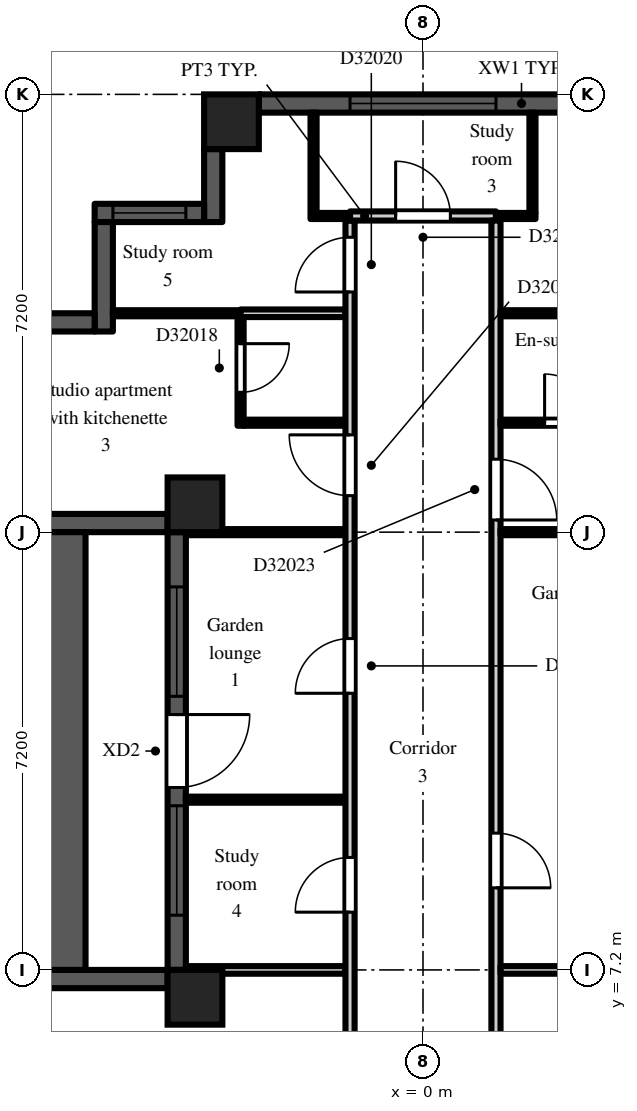
"""IFC4 building model, lengths in metres.
Left out: names, types, materials, properties, quantities, classifications, styles, units other than length and angle.
Written with IfcOpenShell. Run it as: python <this file> out.ifc"""

import sys

from ifc_helpers import new_model, si_unit, direction, frame, frame_2d, origin, origin_2d, place, context, subcontext, project, spatial, rectangle, extrude, element, fill, save


model = new_model("IFC4")
c1 = context("Model", 3, precision=1e-05, world=origin(), true_north=direction((0.0, 1.0)))
c2 = subcontext(c1, "Body", "Model", "MODEL_VIEW")
j1 = project(units=[si_unit("LENGTHUNIT", "METRE"), si_unit("PLANEANGLEUNIT", "RADIAN")], contexts=[c1])
p1 = place(None, origin())
s1 = spatial("IfcSite", under=j1, at=p1, CompositionType="ELEMENT")
p2 = place(p1, origin())
s2 = spatial("IfcBuilding", under=s1, at=p2, CompositionType="ELEMENT")
p3 = place(p2, frame((0.0, 0.0, 225.9)))
s3 = spatial("IfcBuildingStorey", under=s2, at=p3, CompositionType="ELEMENT", Elevation=225.9)
for number, where, z_axis, x_axis in (
    (1, (-3.75, 6.75, 0.0), (0.0, 0.0, 1.0), (1.0, 0.0, 0.0)),
    (2, (-3.75, 14.85, 0.0), (0.0, 0.0, 1.0), (1.0, 0.0, 0.0)),
    (3, (-3.15, 21.15, 0.0), (0.0, 0.0, 1.0), (1.0, 0.0, 0.0)),
):
    element("IfcColumn", number, at=place(p3, frame(where, z_axis=z_axis, x_axis=x_axis)), inside=s3, PredefinedType="COLUMN", context=c2, shape_type="SweptSolid", body=[
        extrude(rectangle(XDim=0.9, YDim=0.9, at=origin_2d()), origin(), (0.0, 0.0, 1.0), 3.0),
    ])
p4 = place(p3, frame((2.7, 21.45, 0.0), z_axis=(0.0, 0.0, 1.0), x_axis=(-1.0, 0.0, 0.0)))
e4 = element("IfcWall", 4, at=p4, inside=s3, PredefinedType="SOLIDWALL", context=c2, shape_type="SweptSolid", body=[
    extrude(rectangle(XDim=5.4, YDim=0.3, at=frame_2d((2.7, 0.0))), origin(), (0.0, 0.0, 1.0), 2.3),
])
p5 = place(p4, frame((1.5, 0.0, 0.2)))
e5 = element("IfcOpeningElement", 5, at=p5, cuts=e4, PredefinedType="OPENING", context=c2, shape_type="SweptSolid", body=[
    extrude(rectangle(XDim=2.4, YDim=1.85, at=frame_2d((1.2, 0.925))), frame((0.0, 0.16, 0.0), z_axis=(0.0, -1.0, 0.0), x_axis=(1.0, 0.0, 0.0)), (0.0, 0.0, 1.0), 0.32),
])
p6 = place(p3, frame((-3.45, 20.7, 0.0), z_axis=(0.0, 0.0, 1.0), x_axis=(0.0, -1.0, 0.0)))
e6 = element("IfcWall", 6, at=p6, inside=s3, PredefinedType="SOLIDWALL", context=c2, shape_type="SweptSolid", body=[
    extrude(rectangle(XDim=1.2, YDim=0.3, at=frame_2d((0.6, 0.0))), origin(), (0.0, 0.0, 1.0), 2.6),
])
p7 = place(p3, frame((-3.6, 19.65, 0.0), z_axis=(0.0, 0.0, 1.0), x_axis=(-1.0, 0.0, 0.0)))
e7 = element("IfcWall", 7, at=p7, inside=s3, PredefinedType="SOLIDWALL", context=c2, shape_type="SweptSolid", body=[
    extrude(rectangle(XDim=1.8, YDim=0.3, at=frame_2d((0.9, 0.0))), origin(), (0.0, 0.0, 1.0), 2.6),
])
p8 = place(p7, frame((0.3, 0.0, 0.2)))
e8 = element("IfcOpeningElement", 8, at=p8, cuts=e7, PredefinedType="OPENING", context=c2, shape_type="SweptSolid", body=[
    extrude(rectangle(XDim=1.2, YDim=1.85, at=frame_2d((0.6, 0.925))), frame((0.0, 0.16, 0.0), z_axis=(0.0, -1.0, 0.0), x_axis=(1.0, 0.0, 0.0)), (0.0, 0.0, 1.0), 0.32),
])
p9 = place(p3, frame((-5.25, 19.5, 0.0), z_axis=(0.0, 0.0, 1.0), x_axis=(0.0, -1.0, 0.0)))
e9 = element("IfcWall", 9, at=p9, inside=s3, PredefinedType="SOLIDWALL", context=c2, shape_type="SweptSolid", body=[
    extrude(rectangle(XDim=1.8, YDim=0.3, at=frame_2d((0.9, 0.0))), origin(), (0.0, 0.0, 1.0), 2.6),
])
p10 = place(p3, frame((-5.4, 17.85, 0.0), z_axis=(0.0, 0.0, 1.0), x_axis=(-1.0, 0.0, 0.0)))
e10 = element("IfcWall", 10, at=p10, inside=s3, PredefinedType="SOLIDWALL", context=c2, shape_type="SweptSolid", body=[
    extrude(rectangle(XDim=0.9, YDim=0.3, at=frame_2d((0.45, 0.0))), origin(), (0.0, 0.0, 1.0), 2.6),
])
p11 = place(p3, frame((-6.3, 14.55, 0.0), z_axis=(0.0, 0.0, 1.0), x_axis=(1.0, 0.0, 0.0)))
e11 = element("IfcWall", 11, at=p11, inside=s3, PredefinedType="SOLIDWALL", context=c2, shape_type="SweptSolid", body=[
    extrude(rectangle(XDim=2.1, YDim=0.3, at=frame_2d((1.05, 0.0))), origin(), (0.0, 0.0, 1.0), 2.3),
])
p12 = place(p3, frame((-4.05, 14.4, 0.0), z_axis=(0.0, 0.0, 1.0), x_axis=(0.0, -1.0, 0.0)))
e12 = element("IfcWall", 12, at=p12, inside=s3, PredefinedType="SOLIDWALL", context=c2, shape_type="SweptSolid", body=[
    extrude(rectangle(XDim=7.2, YDim=0.3, at=frame_2d((3.6, 0.0))), origin(), (0.0, 0.0, 1.0), 2.3),
])
p13 = place(p12, frame((3.0, 0.0, 0.0)))
e13 = element("IfcOpeningElement", 13, at=p13, cuts=e12, PredefinedType="OPENING", context=c2, shape_type="SweptSolid", body=[
    extrude(rectangle(XDim=1.2, YDim=2.05, at=frame_2d((0.6, 1.025))), frame((0.0, 0.16, 0.0), z_axis=(0.0, -1.0, 0.0), x_axis=(1.0, 0.0, 0.0)), (0.0, 0.0, 1.0), 0.32),
])
p14 = place(p12, frame((0.9, 0.0, 0.2)))
e14 = element("IfcOpeningElement", 14, at=p14, cuts=e12, PredefinedType="OPENING", context=c2, shape_type="SweptSolid", body=[
    extrude(rectangle(XDim=1.8, YDim=1.85, at=frame_2d((0.9, 0.925))), frame((0.0, 0.16, 0.0), z_axis=(0.0, -1.0, 0.0), x_axis=(1.0, 0.0, 0.0)), (0.0, 0.0, 1.0), 0.32),
])
p15 = place(p12, frame((4.5, 0.0, 0.2)))
e15 = element("IfcOpeningElement", 15, at=p15, cuts=e12, PredefinedType="OPENING", context=c2, shape_type="SweptSolid", body=[
    extrude(rectangle(XDim=1.8, YDim=1.85, at=frame_2d((0.9, 0.925))), frame((0.0, 0.16, 0.0), z_axis=(0.0, -1.0, 0.0), x_axis=(1.0, 0.0, 0.0)), (0.0, 0.0, 1.0), 0.32),
])
p16 = place(p3, frame((-4.2, 7.05, 0.0), z_axis=(0.0, 0.0, 1.0), x_axis=(-1.0, 0.0, 0.0)))
e16 = element("IfcWall", 16, at=p16, inside=s3, PredefinedType="SOLIDWALL", context=c2, shape_type="SweptSolid", body=[
    extrude(rectangle(XDim=3.0, YDim=0.3, at=frame_2d((1.5, 0.0))), origin(), (0.0, 0.0, 1.0), 2.3),
])
p17 = place(p3, frame((-6.0, 7.2, 0.0), z_axis=(0.0, 0.0, 1.0), x_axis=(0.0, 1.0, 0.0)))
e17 = element("IfcWall", 17, at=p17, inside=s3, PredefinedType="PARAPET", context=c2, shape_type="SweptSolid", body=[
    extrude(rectangle(XDim=7.2, YDim=0.9, at=frame_2d((3.6, 0.0))), origin(), (0.0, 0.0, 1.0), 0.8),
])
p18 = place(p3, frame((-5.1, 18.0, 0.0), z_axis=(0.0, 0.0, 1.0), x_axis=(1.0, 0.0, 0.0)))
e18 = element("IfcWall", 18, at=p18, inside=s3, PredefinedType="PARTITIONING", context=c2, shape_type="SweptSolid", body=[
    extrude(rectangle(XDim=2.1, YDim=0.1, at=frame_2d((1.05, 0.0))), origin(), (0.0, 0.0, 1.0), 2.6),
])
p19 = place(p3, frame((-3.9, 7.2, 0.0), z_axis=(0.0, 0.0, 1.0), x_axis=(1.0, 0.0, 0.0)))
e19 = element("IfcWall", 19, at=p19, inside=s3, PredefinedType="PARTITIONING", context=c2, shape_type="SweptSolid", body=[
    extrude(rectangle(XDim=2.625, YDim=0.125, at=frame_2d((1.312, 0.0))), origin(), (0.0, 0.0, 1.0), 2.6),
])
for number, where, z_axis, x_axis in (
    (20, (-3.9, 10.0, 0.0), (0.0, 0.0, 1.0), (1.0, 0.0, 0.0)),
    (21, (-3.9, 14.4, 0.0), (0.0, 0.0, 1.0), (1.0, 0.0, 0.0)),
):
    element("IfcWall", number, at=place(p3, frame(where, z_axis=z_axis, x_axis=x_axis)), inside=s3, PredefinedType="PARTITIONING", context=c2, shape_type="SweptSolid", body=[
        extrude(rectangle(XDim=2.625, YDim=0.1, at=frame_2d((1.312, 0.0))), origin(), (0.0, 0.0, 1.0), 2.6),
    ])
p20 = place(p3, frame((-3.0, 16.15, 0.0), z_axis=(0.0, 0.0, 1.0), x_axis=(0.0, 1.0, 0.0)))
e22 = element("IfcWall", 22, at=p20, inside=s3, PredefinedType="PARTITIONING", context=c2, shape_type="SweptSolid", body=[
    extrude(rectangle(XDim=1.788, YDim=0.1, at=frame_2d((0.894, 0.0))), origin(), (0.0, 0.0, 1.0), 2.6),
])
p21 = place(p20, frame((0.55, 0.0, 0.0)))
e23 = element("IfcOpeningElement", 23, at=p21, cuts=e22, PredefinedType="OPENING", context=c2, shape_type="SweptSolid", body=[
    extrude(rectangle(XDim=0.8, YDim=2.1, at=frame_2d((0.4, 1.05))), frame((0.0, 0.06, 0.0), z_axis=(0.0, -1.0, 0.0), x_axis=(1.0, 0.0, 0.0)), (0.0, 0.0, 1.0), 0.12),
])
p22 = place(p3, frame((-2.95, 16.2, 0.0), z_axis=(0.0, 0.0, 1.0), x_axis=(1.0, 0.0, 0.0)))
e24 = element("IfcWall", 24, at=p22, inside=s3, PredefinedType="PARTITIONING", context=c2, shape_type="SweptSolid", body=[
    extrude(rectangle(XDim=1.675, YDim=0.1, at=frame_2d((0.837, 0.0))), origin(), (0.0, 0.0, 1.0), 2.6),
])
p23 = place(p3, frame((-3.0, 18.0, 0.0), z_axis=(0.0, 0.0, 1.0), x_axis=(1.0, 0.0, 0.0)))
e25 = element("IfcWall", 25, at=p23, inside=s3, PredefinedType="PARTITIONING", context=c2, shape_type="SweptSolid", body=[
    extrude(rectangle(XDim=1.725, YDim=0.125, at=frame_2d((0.863, 0.0))), origin(), (0.0, 0.0, 1.0), 2.6),
])
p24 = place(p3, frame((-1.8, 19.55, 0.0), z_axis=(0.0, 0.0, 1.0), x_axis=(0.0, 1.0, 0.0)))
e26 = element("IfcWall", 26, at=p24, inside=s3, PredefinedType="PARTITIONING", context=c2, shape_type="SweptSolid", body=[
    extrude(rectangle(XDim=1.75, YDim=0.1, at=frame_2d((0.875, 0.0))), origin(), (0.0, 0.0, 1.0), 2.6),
])
p25 = place(p3, frame((-1.75, 19.6, 0.0), z_axis=(0.0, 0.0, 1.0), x_axis=(1.0, 0.0, 0.0)))
e27 = element("IfcWall", 27, at=p25, inside=s3, PredefinedType="PARTITIONING", context=c2, shape_type="SweptSolid", body=[
    extrude(rectangle(XDim=0.55, YDim=0.1, at=frame_2d((0.275, 0.0))), origin(), (0.0, 0.0, 1.0), 2.6),
])
p26 = place(p3, frame((-1.2, 1.275, 0.0), z_axis=(0.0, 0.0, 1.0), x_axis=(0.0, 1.0, 0.0)))
e28 = element("IfcWall", 28, at=p26, inside=s3, PredefinedType="PARTITIONING", context=c2, shape_type="SweptSolid", body=[
    extrude(rectangle(XDim=18.25, YDim=0.15, at=frame_2d((9.125, 0.0))), origin(), (0.0, 0.0, 1.0), 2.6),
])
p27 = place(p26, frame((0.675, 0.0, 0.0)))
e29 = element("IfcOpeningElement", 29, at=p27, cuts=e28, PredefinedType="OPENING", context=c2, shape_type="SweptSolid", body=[
    extrude(rectangle(XDim=0.9, YDim=2.1, at=frame_2d((0.45, 1.05))), frame((0.0, 0.085, 0.0), z_axis=(0.0, -1.0, 0.0), x_axis=(1.0, 0.0, 0.0)), (0.0, 0.0, 1.0), 0.17),
])
p28 = place(p26, frame((3.675, 0.0, 0.0)))
e30 = element("IfcOpeningElement", 30, at=p28, cuts=e28, PredefinedType="OPENING", context=c2, shape_type="SweptSolid", body=[
    extrude(rectangle(XDim=0.9, YDim=2.1, at=frame_2d((0.45, 1.05))), frame((0.0, 0.085, 0.0), z_axis=(0.0, -1.0, 0.0), x_axis=(1.0, 0.0, 0.0)), (0.0, 0.0, 1.0), 0.17),
])
p29 = place(p26, frame((6.875, 0.0, 0.0)))
e31 = element("IfcOpeningElement", 31, at=p29, cuts=e28, PredefinedType="OPENING", context=c2, shape_type="SweptSolid", body=[
    extrude(rectangle(XDim=0.9, YDim=2.1, at=frame_2d((0.45, 1.05))), frame((0.0, 0.085, 0.0), z_axis=(0.0, -1.0, 0.0), x_axis=(1.0, 0.0, 0.0)), (0.0, 0.0, 1.0), 0.17),
])
p30 = place(p26, frame((10.475, 0.0, 0.0)))
e32 = element("IfcOpeningElement", 32, at=p30, cuts=e28, PredefinedType="OPENING", context=c2, shape_type="SweptSolid", body=[
    extrude(rectangle(XDim=0.9, YDim=2.1, at=frame_2d((0.45, 1.05))), frame((0.0, 0.085, 0.0), z_axis=(0.0, -1.0, 0.0), x_axis=(1.0, 0.0, 0.0)), (0.0, 0.0, 1.0), 0.17),
])
p31 = place(p26, frame((13.725, 0.0, 0.0)))
e33 = element("IfcOpeningElement", 33, at=p31, cuts=e28, PredefinedType="OPENING", context=c2, shape_type="SweptSolid", body=[
    extrude(rectangle(XDim=1.0, YDim=2.1, at=frame_2d((0.5, 1.05))), frame((0.0, 0.085, 0.0), z_axis=(0.0, -1.0, 0.0), x_axis=(1.0, 0.0, 0.0)), (0.0, 0.0, 1.0), 0.17),
])
p32 = place(p26, frame((17.075, 0.0, 0.0)))
e34 = element("IfcOpeningElement", 34, at=p32, cuts=e28, PredefinedType="OPENING", context=c2, shape_type="SweptSolid", body=[
    extrude(rectangle(XDim=0.9, YDim=2.1, at=frame_2d((0.45, 1.05))), frame((0.0, 0.085, 0.0), z_axis=(0.0, -1.0, 0.0), x_axis=(1.0, 0.0, 0.0)), (0.0, 0.0, 1.0), 0.17),
])
p33 = place(p3, frame((-1.2, 19.6, 0.0), z_axis=(0.0, 0.0, 1.0), x_axis=(1.0, 0.0, 0.0)))
e35 = element("IfcWall", 35, at=p33, inside=s3, PredefinedType="PARTITIONING", context=c2, shape_type="SweptSolid", body=[
    extrude(rectangle(XDim=2.4, YDim=0.15, at=frame_2d((1.2, 0.0))), origin(), (0.0, 0.0, 1.0), 2.6),
])
p34 = place(p33, frame((0.75, 0.0, 0.0)))
e36 = element("IfcOpeningElement", 36, at=p34, cuts=e35, PredefinedType="OPENING", context=c2, shape_type="SweptSolid", body=[
    extrude(rectangle(XDim=0.9, YDim=2.1, at=frame_2d((0.45, 1.05))), frame((0.0, 0.085, 0.0), z_axis=(0.0, -1.0, 0.0), x_axis=(1.0, 0.0, 0.0)), (0.0, 0.0, 1.0), 0.17),
])
p35 = place(p3, frame((1.2, 1.125, 0.0), z_axis=(0.0, 0.0, 1.0), x_axis=(0.0, 1.0, 0.0)))
e37 = element("IfcWall", 37, at=p35, inside=s3, PredefinedType="PARTITIONING", context=c2, shape_type="SweptSolid", body=[
    extrude(rectangle(XDim=18.4, YDim=0.15, at=frame_2d((9.2, 0.0))), origin(), (0.0, 0.0, 1.0), 2.6),
])
p36 = place(p35, frame((2.625, 0.0, 0.0)))
e38 = element("IfcOpeningElement", 38, at=p36, cuts=e37, PredefinedType="OPENING", context=c2, shape_type="SweptSolid", body=[
    extrude(rectangle(XDim=0.9, YDim=2.1, at=frame_2d((0.45, 1.05))), frame((0.0, 0.085, 0.0), z_axis=(0.0, -1.0, 0.0), x_axis=(1.0, 0.0, 0.0)), (0.0, 0.0, 1.0), 0.17),
])
p37 = place(p35, frame((7.425, 0.0, 0.0)))
e39 = element("IfcOpeningElement", 39, at=p37, cuts=e37, PredefinedType="OPENING", context=c2, shape_type="SweptSolid", body=[
    extrude(rectangle(XDim=0.9, YDim=2.1, at=frame_2d((0.45, 1.05))), frame((0.0, 0.085, 0.0), z_axis=(0.0, -1.0, 0.0), x_axis=(1.0, 0.0, 0.0)), (0.0, 0.0, 1.0), 0.17),
])
p38 = place(p35, frame((13.475, 0.0, 0.0)))
e40 = element("IfcOpeningElement", 40, at=p38, cuts=e37, PredefinedType="OPENING", context=c2, shape_type="SweptSolid", body=[
    extrude(rectangle(XDim=1.0, YDim=2.1, at=frame_2d((0.5, 1.05))), frame((0.0, 0.085, 0.0), z_axis=(0.0, -1.0, 0.0), x_axis=(1.0, 0.0, 0.0)), (0.0, 0.0, 1.0), 0.17),
])
p39 = place(p3, frame((1.275, 7.2, 0.0), z_axis=(0.0, 0.0, 1.0), x_axis=(1.0, 0.0, 0.0)))
e41 = element("IfcWall", 41, at=p39, inside=s3, PredefinedType="PARTITIONING", context=c2, shape_type="SweptSolid", body=[
    extrude(rectangle(XDim=2.625, YDim=0.125, at=frame_2d((1.312, 0.0))), origin(), (0.0, 0.0, 1.0), 2.6),
])
p40 = place(p3, frame((1.275, 14.4, 0.0), z_axis=(0.0, 0.0, 1.0), x_axis=(1.0, 0.0, 0.0)))
e42 = element("IfcWall", 42, at=p40, inside=s3, PredefinedType="PARTITIONING", context=c2, shape_type="SweptSolid", body=[
    extrude(rectangle(XDim=2.625, YDim=0.1, at=frame_2d((1.312, 0.0))), origin(), (0.0, 0.0, 1.0), 2.6),
])
p41 = place(p3, frame((1.275, 16.2, 0.0), z_axis=(0.0, 0.0, 1.0), x_axis=(1.0, 0.0, 0.0)))
e43 = element("IfcWall", 43, at=p41, inside=s3, PredefinedType="PARTITIONING", context=c2, shape_type="SweptSolid", body=[
    extrude(rectangle(XDim=2.375, YDim=0.1, at=frame_2d((1.188, 0.0))), origin(), (0.0, 0.0, 1.0), 2.6),
])
p42 = place(p41, frame((0.725, 0.0, 0.0)))
e44 = element("IfcOpeningElement", 44, at=p42, cuts=e43, PredefinedType="OPENING", context=c2, shape_type="SweptSolid", body=[
    extrude(rectangle(XDim=0.8, YDim=2.1, at=frame_2d((0.4, 1.05))), frame((0.0, 0.06, 0.0), z_axis=(0.0, -1.0, 0.0), x_axis=(1.0, 0.0, 0.0)), (0.0, 0.0, 1.0), 0.12),
])
p43 = place(p3, frame((1.275, 18.0, 0.0), z_axis=(0.0, 0.0, 1.0), x_axis=(1.0, 0.0, 0.0)))
e45 = element("IfcWall", 45, at=p43, inside=s3, PredefinedType="PARTITIONING", context=c2, shape_type="SweptSolid", body=[
    extrude(rectangle(XDim=2.375, YDim=0.1, at=frame_2d((1.188, 0.0))), origin(), (0.0, 0.0, 1.0), 2.6),
])
p44 = place(p3, frame((1.2, 19.6, 0.0), z_axis=(0.0, 0.0, 1.0), x_axis=(1.0, 0.0, 0.0)))
e46 = element("IfcWall", 46, at=p44, inside=s3, PredefinedType="PARTITIONING", context=c2, shape_type="SweptSolid", body=[
    extrude(rectangle(XDim=0.65, YDim=0.1, at=frame_2d((0.325, 0.0))), origin(), (0.0, 0.0, 1.0), 2.6),
])
p45 = place(p3, frame((1.8, 19.65, 0.0), z_axis=(0.0, 0.0, 1.0), x_axis=(0.0, 1.0, 0.0)))
e47 = element("IfcWall", 47, at=p45, inside=s3, PredefinedType="PARTITIONING", context=c2, shape_type="SweptSolid", body=[
    extrude(rectangle(XDim=1.65, YDim=0.1, at=frame_2d((0.825, 0.0))), origin(), (0.0, 0.0, 1.0), 2.6),
])
p46 = place(p5, origin())
e48 = element("IfcWindow", 48, at=p46, inside=s3, PartitioningType="SINGLE_PANEL", PredefinedType="WINDOW", context=c2, shape_type="SweptSolid", body=[
    extrude(rectangle(XDim=2.4, YDim=1.85, at=frame_2d((1.2, 0.925))), frame((0.0, 0.03, 0.0), z_axis=(0.0, -1.0, 0.0), x_axis=(1.0, 0.0, 0.0)), (0.0, 0.0, 1.0), 0.06),
])
fill(e5, e48)
p47 = place(p8, origin())
e49 = element("IfcWindow", 49, at=p47, inside=s3, PartitioningType="SINGLE_PANEL", PredefinedType="WINDOW", context=c2, shape_type="SweptSolid", body=[
    extrude(rectangle(XDim=1.2, YDim=1.85, at=frame_2d((0.6, 0.925))), frame((0.0, 0.03, 0.0), z_axis=(0.0, -1.0, 0.0), x_axis=(1.0, 0.0, 0.0)), (0.0, 0.0, 1.0), 0.06),
])
fill(e8, e49)
p48 = place(p13, origin())
e50 = element("IfcDoor", 50, at=p48, inside=s3, OperationType="SINGLE_SWING_LEFT", PredefinedType="DOOR", context=c2, shape_type="SweptSolid", body=[
    extrude(rectangle(XDim=1.2, YDim=2.05, at=frame_2d((0.6, 1.025))), frame((0.0, 0.025, 0.0), z_axis=(0.0, -1.0, 0.0), x_axis=(1.0, 0.0, 0.0)), (0.0, 0.0, 1.0), 0.05),
])
fill(e13, e50)
p49 = place(p14, origin())
e51 = element("IfcWindow", 51, at=p49, inside=s3, PartitioningType="SINGLE_PANEL", PredefinedType="WINDOW", context=c2, shape_type="SweptSolid", body=[
    extrude(rectangle(XDim=1.8, YDim=1.85, at=frame_2d((0.9, 0.925))), frame((0.0, 0.03, 0.0), z_axis=(0.0, -1.0, 0.0), x_axis=(1.0, 0.0, 0.0)), (0.0, 0.0, 1.0), 0.06),
])
fill(e14, e51)
p50 = place(p15, origin())
e52 = element("IfcWindow", 52, at=p50, inside=s3, PartitioningType="SINGLE_PANEL", PredefinedType="WINDOW", context=c2, shape_type="SweptSolid", body=[
    extrude(rectangle(XDim=1.8, YDim=1.85, at=frame_2d((0.9, 0.925))), frame((0.0, 0.03, 0.0), z_axis=(0.0, -1.0, 0.0), x_axis=(1.0, 0.0, 0.0)), (0.0, 0.0, 1.0), 0.06),
])
fill(e15, e52)
p51 = place(p34, origin())
e53 = element("IfcDoor", 53, at=p51, inside=s3, OperationType="SINGLE_SWING_LEFT", PredefinedType="DOOR", context=c2, shape_type="SweptSolid", body=[
    extrude(rectangle(XDim=0.9, YDim=2.1, at=frame_2d((0.45, 1.05))), frame((0.0, 0.025, 0.0), z_axis=(0.0, -1.0, 0.0), x_axis=(1.0, 0.0, 0.0)), (0.0, 0.0, 1.0), 0.05),
])
fill(e36, e53)
p52 = place(p29, origin())
e54 = element("IfcDoor", 54, at=p52, inside=s3, OperationType="SINGLE_SWING_LEFT", PredefinedType="DOOR", context=c2, shape_type="SweptSolid", body=[
    extrude(rectangle(XDim=0.9, YDim=2.1, at=frame_2d((0.45, 1.05))), frame((0.0, 0.025, 0.0), z_axis=(0.0, -1.0, 0.0), x_axis=(1.0, 0.0, 0.0)), (0.0, 0.0, 1.0), 0.05),
])
fill(e31, e54)
p53 = place(p30, origin())
e55 = element("IfcDoor", 55, at=p53, inside=s3, OperationType="SINGLE_SWING_LEFT", PredefinedType="DOOR", context=c2, shape_type="SweptSolid", body=[
    extrude(rectangle(XDim=0.9, YDim=2.1, at=frame_2d((0.45, 1.05))), frame((0.0, 0.025, 0.0), z_axis=(0.0, -1.0, 0.0), x_axis=(1.0, 0.0, 0.0)), (0.0, 0.0, 1.0), 0.05),
])
fill(e32, e55)
p54 = place(p21, frame((0.8, 0.0, 0.0), z_axis=(0.0, 0.0, 1.0), x_axis=(-1.0, 0.0, 0.0)))
e56 = element("IfcDoor", 56, at=p54, inside=s3, OperationType="SINGLE_SWING_LEFT", PredefinedType="DOOR", context=c2, shape_type="SweptSolid", body=[
    extrude(rectangle(XDim=0.8, YDim=2.1, at=frame_2d((0.4, 1.05))), frame((0.0, 0.025, 0.0), z_axis=(0.0, -1.0, 0.0), x_axis=(1.0, 0.0, 0.0)), (0.0, 0.0, 1.0), 0.05),
])
fill(e23, e56)
p55 = place(p31, origin())
e57 = element("IfcDoor", 57, at=p55, inside=s3, OperationType="SINGLE_SWING_RIGHT", PredefinedType="DOOR", context=c2, shape_type="SweptSolid", body=[
    extrude(rectangle(XDim=1.0, YDim=2.1, at=frame_2d((0.5, 1.05))), frame((0.0, 0.025, 0.0), z_axis=(0.0, -1.0, 0.0), x_axis=(1.0, 0.0, 0.0)), (0.0, 0.0, 1.0), 0.05),
])
fill(e33, e57)
p56 = place(p32, origin())
e58 = element("IfcDoor", 58, at=p56, inside=s3, OperationType="SINGLE_SWING_LEFT", PredefinedType="DOOR", context=c2, shape_type="SweptSolid", body=[
    extrude(rectangle(XDim=0.9, YDim=2.1, at=frame_2d((0.45, 1.05))), frame((0.0, 0.025, 0.0), z_axis=(0.0, -1.0, 0.0), x_axis=(1.0, 0.0, 0.0)), (0.0, 0.0, 1.0), 0.05),
])
fill(e34, e58)
p57 = place(p37, frame((0.9, 0.0, 0.0), z_axis=(0.0, 0.0, 1.0), x_axis=(-1.0, 0.0, 0.0)))
e59 = element("IfcDoor", 59, at=p57, inside=s3, OperationType="SINGLE_SWING_RIGHT", PredefinedType="DOOR", context=c2, shape_type="SweptSolid", body=[
    extrude(rectangle(XDim=0.9, YDim=2.1, at=frame_2d((0.45, 1.05))), frame((0.0, 0.025, 0.0), z_axis=(0.0, -1.0, 0.0), x_axis=(1.0, 0.0, 0.0)), (0.0, 0.0, 1.0), 0.05),
])
fill(e39, e59)
p58 = place(p42, origin())
e60 = element("IfcDoor", 60, at=p58, inside=s3, OperationType="SINGLE_SWING_LEFT", PredefinedType="DOOR", context=c2, shape_type="SweptSolid", body=[
    extrude(rectangle(XDim=0.8, YDim=2.1, at=frame_2d((0.4, 1.05))), frame((0.0, 0.025, 0.0), z_axis=(0.0, -1.0, 0.0), x_axis=(1.0, 0.0, 0.0)), (0.0, 0.0, 1.0), 0.05),
])
fill(e44, e60)
p59 = place(p38, frame((1.0, 0.0, 0.0), z_axis=(0.0, 0.0, 1.0), x_axis=(-1.0, 0.0, 0.0)))
e61 = element("IfcDoor", 61, at=p59, inside=s3, OperationType="SINGLE_SWING_RIGHT", PredefinedType="DOOR", context=c2, shape_type="SweptSolid", body=[
    extrude(rectangle(XDim=1.0, YDim=2.1, at=frame_2d((0.5, 1.05))), frame((0.0, 0.025, 0.0), z_axis=(0.0, -1.0, 0.0), x_axis=(1.0, 0.0, 0.0)), (0.0, 0.0, 1.0), 0.05),
])
fill(e40, e61)
save(model, sys.argv[1])
